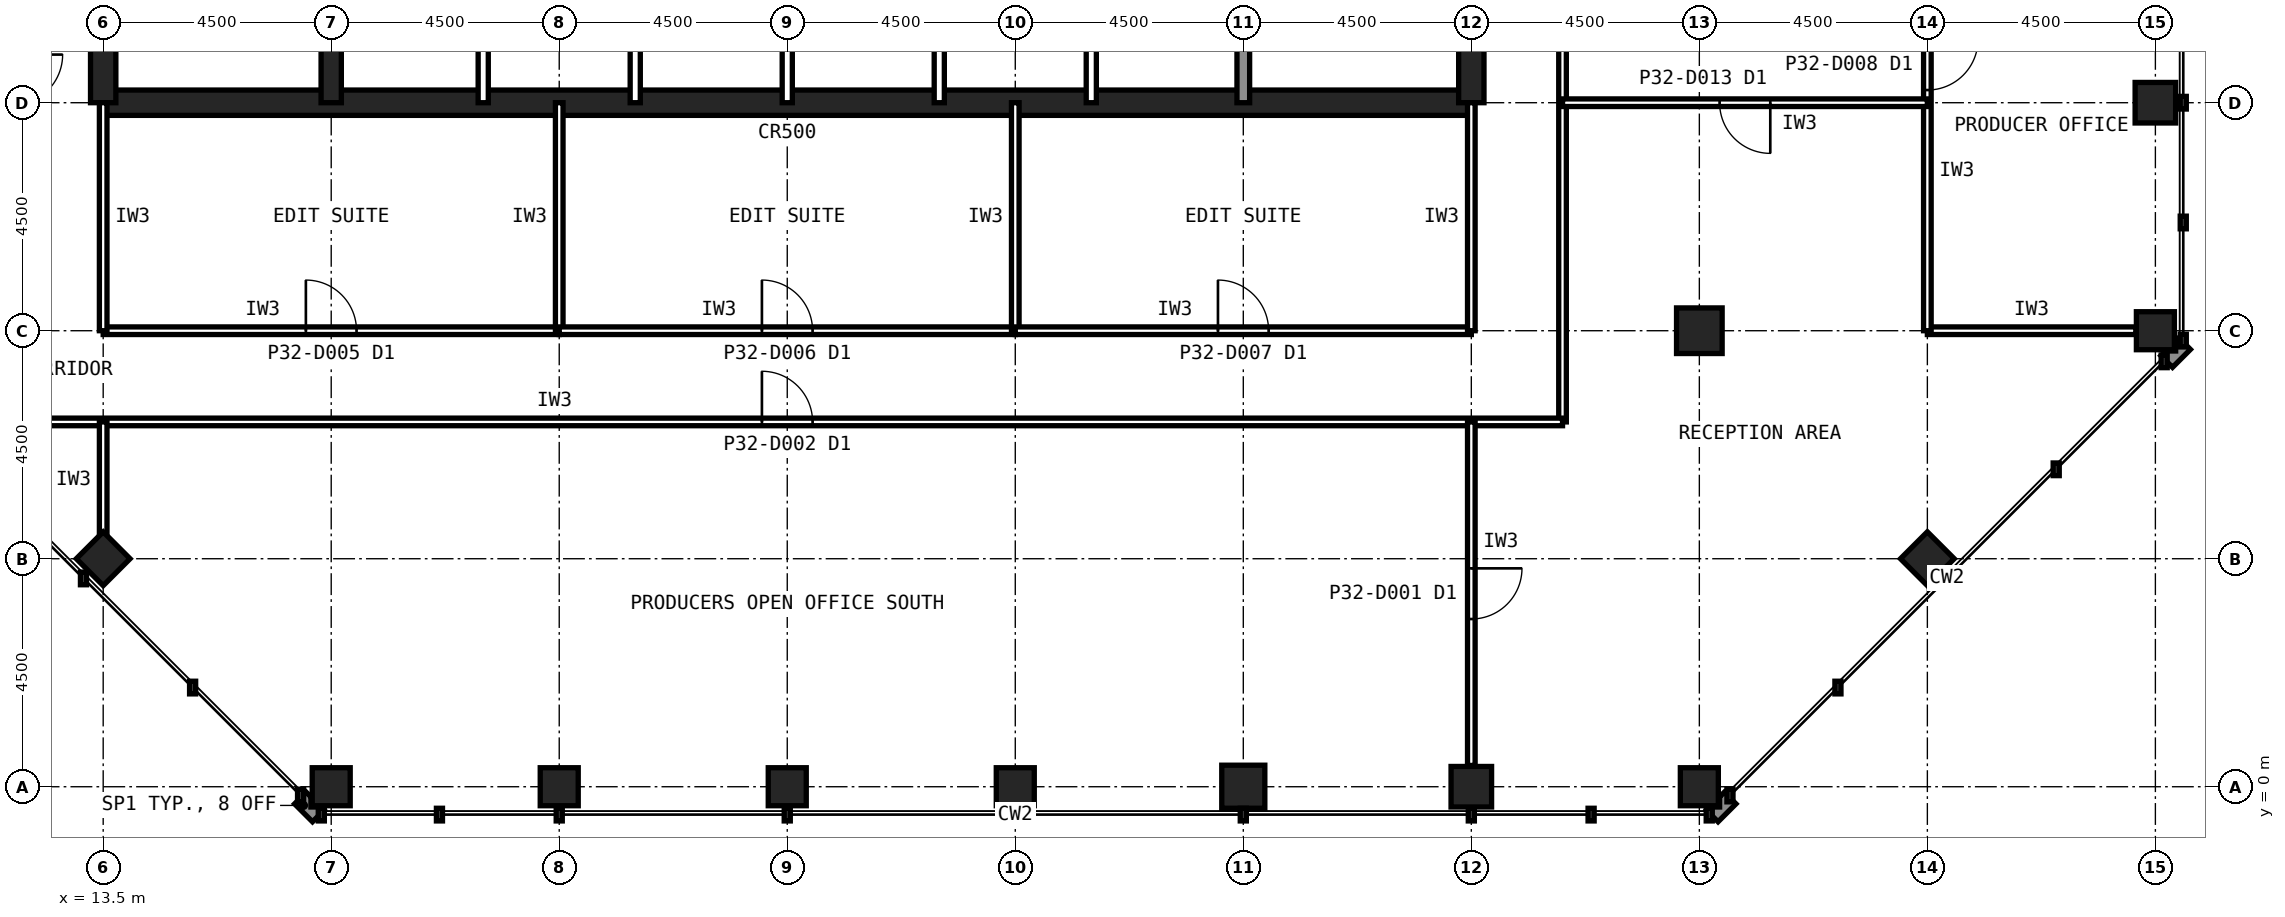
"""IFC4 building model, lengths in metres.
Left out: names, types, materials, properties, quantities, classifications, styles, units other than length and angle.
Written with IfcOpenShell. Run it as: python <this file> out.ifc"""

import sys

from ifc_helpers import new_model, si_unit, direction, frame, frame_2d, origin, origin_2d, place, context, subcontext, project, spatial, rectangle, hollow_rectangle, extrude, element, fill, save


model = new_model("IFC4")
c1 = context("Model", 3, precision=1e-05, world=origin(), true_north=direction((0.0, 1.0)))
c2 = subcontext(c1, "Body", "Model", "MODEL_VIEW")
j1 = project(units=[si_unit("LENGTHUNIT", "METRE"), si_unit("PLANEANGLEUNIT", "RADIAN")], contexts=[c1])
p1 = place(None, origin())
s1 = spatial("IfcSite", under=j1, at=p1, CompositionType="ELEMENT")
p2 = place(p1, origin())
s2 = spatial("IfcBuilding", under=s1, at=p2, CompositionType="ELEMENT")
p3 = place(p2, frame((0.0, 0.0, 135.6)))
s3 = spatial("IfcBuildingStorey", under=s2, at=p3, CompositionType="ELEMENT", Elevation=135.6)
for number, where, z_axis, x_axis in (
    (1, (18.0, 0.0, 0.0), (0.0, 0.0, 1.0), (1.0, 0.0, 0.0)),
    (2, (22.5, 0.0, 0.0), (0.0, 0.0, 1.0), (1.0, 0.0, 0.0)),
    (3, (27.0, 0.0, 0.0), (0.0, 0.0, 1.0), (1.0, 0.0, 0.0)),
    (4, (31.5, 0.0, 0.0), (0.0, 0.0, 1.0), (1.0, 0.0, 0.0)),
):
    element("IfcColumn", number, at=place(p3, frame(where, z_axis=z_axis, x_axis=x_axis)), inside=s3, PredefinedType="COLUMN", context=c2, shape_type="SweptSolid", body=[
        extrude(hollow_rectangle(XDim=0.75, YDim=0.75, WallThickness=0.04, at=origin_2d()), origin(), (0.0, 0.0, 1.0), 4.0),
    ])
p4 = place(p3, frame((36.0, 0.0, 0.0), z_axis=(0.0, 0.0, 1.0), x_axis=(1.0, 0.0, 0.0)))
e5 = element("IfcColumn", 5, at=p4, inside=s3, PredefinedType="COLUMN", context=c2, shape_type="SweptSolid", body=[
    extrude(hollow_rectangle(XDim=0.85, YDim=0.85, WallThickness=0.05, at=origin_2d()), origin(), (0.0, 0.0, 1.0), 4.0),
])
p5 = place(p3, frame((40.5, 0.0, 0.0), z_axis=(0.0, 0.0, 1.0), x_axis=(1.0, 0.0, 0.0)))
e6 = element("IfcColumn", 6, at=p5, inside=s3, PredefinedType="COLUMN", context=c2, shape_type="SweptSolid", body=[
    extrude(hollow_rectangle(XDim=0.8, YDim=0.8, WallThickness=0.045, at=origin_2d()), origin(), (0.0, 0.0, 1.0), 4.0),
])
for number, where, z_axis, x_axis in (
    (7, (45.0, 0.0, 0.0), (0.0, 0.0, 1.0), (1.0, 0.0, 0.0)),
    (8, (54.0, 9.0, 0.0), (0.0, 0.0, 1.0), (1.0, 0.0, 0.0)),
):
    element("IfcColumn", number, at=place(p3, frame(where, z_axis=z_axis, x_axis=x_axis)), inside=s3, PredefinedType="COLUMN", context=c2, shape_type="SweptSolid", body=[
        extrude(hollow_rectangle(XDim=0.75, YDim=0.75, WallThickness=0.04, at=origin_2d()), origin(), (0.0, 0.0, 1.0), 4.0),
    ])
p6 = place(p3, frame((54.0, 13.5, 0.0), z_axis=(0.0, 0.0, 1.0), x_axis=(1.0, 0.0, 0.0)))
e9 = element("IfcColumn", 9, at=p6, inside=s3, PredefinedType="COLUMN", context=c2, shape_type="SweptSolid", body=[
    extrude(hollow_rectangle(XDim=0.8, YDim=0.8, WallThickness=0.045, at=origin_2d()), origin(), (0.0, 0.0, 1.0), 4.0),
])
for number, where, z_axis, x_axis in (
    (10, (13.5, 4.5, 0.0), (0.0, 0.0, 1.0), (0.707, 0.707, 0.0)),
    (11, (49.5, 4.5, 0.0), (0.0, 0.0, 1.0), (0.707, 0.707, 0.0)),
):
    element("IfcColumn", number, at=place(p3, frame(where, z_axis=z_axis, x_axis=x_axis)), inside=s3, PredefinedType="COLUMN", context=c2, shape_type="SweptSolid", body=[
        extrude(hollow_rectangle(XDim=0.75, YDim=0.75, WallThickness=0.04, at=origin_2d()), origin(), (0.0, 0.0, 1.0), 4.0),
    ])
p7 = place(p3, frame((45.0, 9.0, 0.0), z_axis=(0.0, 0.0, 1.0), x_axis=(1.0, 0.0, 0.0)))
e12 = element("IfcColumn", 12, at=p7, inside=s3, PredefinedType="COLUMN", context=c2, shape_type="SweptSolid", body=[
    extrude(hollow_rectangle(XDim=0.9, YDim=0.9, WallThickness=0.063, at=origin_2d()), origin(), (0.0, 0.0, 1.0), 4.0),
])
p8 = place(p3, frame((13.5, 13.5, 0.0), z_axis=(0.0, 0.0, 1.0), x_axis=(1.0, 0.0, 0.0)))
e13 = element("IfcWall", 13, at=p8, inside=s3, PredefinedType="SHEAR", context=c2, shape_type="SweptSolid", body=[
    extrude(rectangle(XDim=27.0, YDim=0.5, at=frame_2d((13.5, 0.0))), origin(), (0.0, 0.0, 1.0), 4.0),
])
p9 = place(p3, frame((40.5, 13.5, 0.0), z_axis=(0.0, 0.0, 1.0), x_axis=(0.0, 1.0, 0.0)))
e14 = element("IfcWall", 14, at=p9, inside=s3, PredefinedType="SHEAR", context=c2, shape_type="SweptSolid", body=[
    extrude(rectangle(XDim=27.0, YDim=0.5, at=frame_2d((13.5, 0.0))), origin(), (0.0, 0.0, 1.0), 4.0),
])
p10 = place(p9, frame((5.85, 0.0, 0.0)))
e15 = element("IfcOpeningElement", 15, at=p10, cuts=e14, PredefinedType="OPENING", context=c2, shape_type="SweptSolid", body=[
    extrude(rectangle(XDim=1.8, YDim=2.1, at=frame_2d((0.9, 1.05))), frame((0.0, 0.26, 0.0), z_axis=(0.0, -1.0, 0.0), x_axis=(1.0, 0.0, 0.0)), (0.0, 0.0, 1.0), 0.52),
])
p11 = place(p9, frame((19.65, 0.0, 0.0)))
e16 = element("IfcOpeningElement", 16, at=p11, cuts=e14, PredefinedType="OPENING", context=c2, shape_type="SweptSolid", body=[
    extrude(rectangle(XDim=1.2, YDim=2.1, at=frame_2d((0.6, 1.05))), frame((0.0, 0.26, 0.0), z_axis=(0.0, -1.0, 0.0), x_axis=(1.0, 0.0, 0.0)), (0.0, 0.0, 1.0), 0.52),
])
p12 = place(p3, frame((13.5, 40.5, 0.0), z_axis=(0.0, 0.0, 1.0), x_axis=(0.0, -1.0, 0.0)))
e17 = element("IfcWall", 17, at=p12, inside=s3, PredefinedType="SHEAR", context=c2, shape_type="SweptSolid", body=[
    extrude(rectangle(XDim=27.0, YDim=0.5, at=frame_2d((13.5, 0.0))), origin(), (0.0, 0.0, 1.0), 4.0),
])
p13 = place(p12, frame((19.65, 0.0, 0.0)))
e18 = element("IfcOpeningElement", 18, at=p13, cuts=e17, PredefinedType="OPENING", context=c2, shape_type="SweptSolid", body=[
    extrude(rectangle(XDim=1.2, YDim=2.1, at=frame_2d((0.6, 1.05))), frame((0.0, 0.26, 0.0), z_axis=(0.0, -1.0, 0.0), x_axis=(1.0, 0.0, 0.0)), (0.0, 0.0, 1.0), 0.52),
])
p14 = place(p12, frame((5.85, 0.0, 0.0)))
e19 = element("IfcOpeningElement", 19, at=p14, cuts=e17, PredefinedType="OPENING", context=c2, shape_type="SweptSolid", body=[
    extrude(rectangle(XDim=1.8, YDim=2.1, at=frame_2d((0.9, 1.05))), frame((0.0, 0.26, 0.0), z_axis=(0.0, -1.0, 0.0), x_axis=(1.0, 0.0, 0.0)), (0.0, 0.0, 1.0), 0.52),
])
p15 = place(p3, frame((18.0, 13.5, 0.0), z_axis=(0.0, 0.0, 1.0), x_axis=(0.0, 1.0, 0.0)))
e20 = element("IfcWall", 20, at=p15, inside=s3, PredefinedType="SHEAR", context=c2, shape_type="SweptSolid", body=[
    extrude(rectangle(XDim=18.0, YDim=0.4, at=frame_2d((9.0, 0.0))), origin(), (0.0, 0.0, 1.0), 4.0),
])
p16 = place(p3, frame((36.0, 13.5, 0.0), z_axis=(0.0, 0.0, 1.0), x_axis=(0.0, 1.0, 0.0)))
e21 = element("IfcWall", 21, at=p16, inside=s3, PredefinedType="SOLIDWALL", context=c2, shape_type="SweptSolid", body=[
    extrude(rectangle(XDim=4.5, YDim=0.25, at=frame_2d((2.25, 0.0))), origin(), (0.0, 0.0, 1.0), 3.84),
])
for number, where, z_axis, x_axis in (
    (22, (21.0, 13.5, 0.0), (0.0, 0.0, 1.0), (0.0, 1.0, 0.0)),
    (23, (24.0, 13.5, 0.0), (0.0, 0.0, 1.0), (0.0, 1.0, 0.0)),
    (24, (27.0, 13.5, 0.0), (0.0, 0.0, 1.0), (0.0, 1.0, 0.0)),
    (25, (30.0, 13.5, 0.0), (0.0, 0.0, 1.0), (0.0, 1.0, 0.0)),
    (26, (33.0, 13.5, 0.0), (0.0, 0.0, 1.0), (0.0, 1.0, 0.0)),
):
    element("IfcWall", number, at=place(p3, frame(where, z_axis=z_axis, x_axis=x_axis)), inside=s3, PredefinedType="PARTITIONING", context=c2, shape_type="SweptSolid", body=[
        extrude(rectangle(XDim=4.5, YDim=0.2, at=frame_2d((2.25, 0.0))), origin(), (0.0, 0.0, 1.0), 3.84),
    ])
p17 = place(p3, frame((42.3, 7.2, 0.0), z_axis=(0.0, 0.0, 1.0), x_axis=(0.0, 1.0, 0.0)))
e27 = element("IfcWall", 27, at=p17, inside=s3, PredefinedType="PARTITIONING", context=c2, shape_type="SweptSolid", body=[
    extrude(rectangle(XDim=33.3, YDim=0.15, at=frame_2d((16.65, 0.0))), origin(), (0.0, 0.0, 1.0), 3.84),
])
p18 = place(p17, frame((16.15, 0.0, 0.0)))
e28 = element("IfcOpeningElement", 28, at=p18, cuts=e27, PredefinedType="OPENING", context=c2, shape_type="SweptSolid", body=[
    extrude(rectangle(XDim=1.0, YDim=2.1, at=frame_2d((0.5, 1.05))), frame((0.0, 0.085, 0.0), z_axis=(0.0, -1.0, 0.0), x_axis=(1.0, 0.0, 0.0)), (0.0, 0.0, 1.0), 0.17),
])
p19 = place(p3, frame((11.7, 7.2, 0.0), z_axis=(0.0, 0.0, 1.0), x_axis=(1.0, 0.0, 0.0)))
e29 = element("IfcWall", 29, at=p19, inside=s3, PredefinedType="PARTITIONING", context=c2, shape_type="SweptSolid", body=[
    extrude(rectangle(XDim=30.6, YDim=0.15, at=frame_2d((15.3, 0.0))), origin(), (0.0, 0.0, 1.0), 3.84),
])
p20 = place(p19, frame((14.8, 0.0, 0.0)))
e30 = element("IfcOpeningElement", 30, at=p20, cuts=e29, PredefinedType="OPENING", context=c2, shape_type="SweptSolid", body=[
    extrude(rectangle(XDim=1.0, YDim=2.1, at=frame_2d((0.5, 1.05))), frame((0.0, 0.085, 0.0), z_axis=(0.0, -1.0, 0.0), x_axis=(1.0, 0.0, 0.0)), (0.0, 0.0, 1.0), 0.17),
])
p21 = place(p3, frame((13.5, 9.0, 0.0), z_axis=(0.0, 0.0, 1.0), x_axis=(1.0, 0.0, 0.0)))
e31 = element("IfcWall", 31, at=p21, inside=s3, PredefinedType="PARTITIONING", context=c2, shape_type="SweptSolid", body=[
    extrude(rectangle(XDim=9.0, YDim=0.15, at=frame_2d((4.5, 0.0))), origin(), (0.0, 0.0, 1.0), 3.84),
])
p22 = place(p21, frame((4.0, 0.0, 0.0)))
e32 = element("IfcOpeningElement", 32, at=p22, cuts=e31, PredefinedType="OPENING", context=c2, shape_type="SweptSolid", body=[
    extrude(rectangle(XDim=1.0, YDim=2.1, at=frame_2d((0.5, 1.05))), frame((0.0, 0.085, 0.0), z_axis=(0.0, -1.0, 0.0), x_axis=(1.0, 0.0, 0.0)), (0.0, 0.0, 1.0), 0.17),
])
for number, where, z_axis, x_axis in (
    (33, (22.5, 9.0, 0.0), (0.0, 0.0, 1.0), (0.0, 1.0, 0.0)),
    (34, (13.5, 13.5, 0.0), (0.0, 0.0, 1.0), (0.0, -1.0, 0.0)),
):
    element("IfcWall", number, at=place(p3, frame(where, z_axis=z_axis, x_axis=x_axis)), inside=s3, PredefinedType="PARTITIONING", context=c2, shape_type="SweptSolid", body=[
        extrude(rectangle(XDim=4.5, YDim=0.15, at=frame_2d((2.25, 0.0))), origin(), (0.0, 0.0, 1.0), 2.989),
    ])
p23 = place(p3, frame((22.5, 9.0, 0.0), z_axis=(0.0, 0.0, 1.0), x_axis=(1.0, 0.0, 0.0)))
e35 = element("IfcWall", 35, at=p23, inside=s3, PredefinedType="PARTITIONING", context=c2, shape_type="SweptSolid", body=[
    extrude(rectangle(XDim=9.0, YDim=0.15, at=frame_2d((4.5, 0.0))), origin(), (0.0, 0.0, 1.0), 3.84),
])
p24 = place(p23, frame((4.0, 0.0, 0.0)))
e36 = element("IfcOpeningElement", 36, at=p24, cuts=e35, PredefinedType="OPENING", context=c2, shape_type="SweptSolid", body=[
    extrude(rectangle(XDim=1.0, YDim=2.1, at=frame_2d((0.5, 1.05))), frame((0.0, 0.085, 0.0), z_axis=(0.0, -1.0, 0.0), x_axis=(1.0, 0.0, 0.0)), (0.0, 0.0, 1.0), 0.17),
])
p25 = place(p3, frame((31.5, 9.0, 0.0), z_axis=(0.0, 0.0, 1.0), x_axis=(0.0, 1.0, 0.0)))
e37 = element("IfcWall", 37, at=p25, inside=s3, PredefinedType="PARTITIONING", context=c2, shape_type="SweptSolid", body=[
    extrude(rectangle(XDim=4.5, YDim=0.15, at=frame_2d((2.25, 0.0))), origin(), (0.0, 0.0, 1.0), 2.989),
])
p26 = place(p3, frame((31.5, 9.0, 0.0), z_axis=(0.0, 0.0, 1.0), x_axis=(1.0, 0.0, 0.0)))
e38 = element("IfcWall", 38, at=p26, inside=s3, PredefinedType="PARTITIONING", context=c2, shape_type="SweptSolid", body=[
    extrude(rectangle(XDim=9.0, YDim=0.15, at=frame_2d((4.5, 0.0))), origin(), (0.0, 0.0, 1.0), 3.84),
])
p27 = place(p26, frame((4.0, 0.0, 0.0)))
e39 = element("IfcOpeningElement", 39, at=p27, cuts=e38, PredefinedType="OPENING", context=c2, shape_type="SweptSolid", body=[
    extrude(rectangle(XDim=1.0, YDim=2.1, at=frame_2d((0.5, 1.05))), frame((0.0, 0.085, 0.0), z_axis=(0.0, -1.0, 0.0), x_axis=(1.0, 0.0, 0.0)), (0.0, 0.0, 1.0), 0.17),
])
p28 = place(p3, frame((40.5, 9.0, 0.0), z_axis=(0.0, 0.0, 1.0), x_axis=(0.0, 1.0, 0.0)))
e40 = element("IfcWall", 40, at=p28, inside=s3, PredefinedType="PARTITIONING", context=c2, shape_type="SweptSolid", body=[
    extrude(rectangle(XDim=4.5, YDim=0.15, at=frame_2d((2.25, 0.0))), origin(), (0.0, 0.0, 1.0), 2.989),
])
p29 = place(p3, frame((49.5, 9.0, 0.0), z_axis=(0.0, 0.0, 1.0), x_axis=(1.0, 0.0, 0.0)))
e41 = element("IfcWall", 41, at=p29, inside=s3, PredefinedType="PARTITIONING", context=c2, shape_type="SweptSolid", body=[
    extrude(rectangle(XDim=4.115, YDim=0.15, at=frame_2d((2.058, 0.0))), origin(), (0.0, 0.0, 1.0), 3.229),
])
p30 = place(p3, frame((49.5, 18.0, 0.0), z_axis=(0.0, 0.0, 1.0), x_axis=(0.0, -1.0, 0.0)))
e42 = element("IfcWall", 42, at=p30, inside=s3, PredefinedType="PARTITIONING", context=c2, shape_type="SweptSolid", body=[
    extrude(rectangle(XDim=9.0, YDim=0.15, at=frame_2d((4.5, 0.0))), origin(), (0.0, 0.0, 1.0), 3.84),
])
p31 = place(p30, frame((3.25, 0.0, 0.0)))
e43 = element("IfcOpeningElement", 43, at=p31, cuts=e42, PredefinedType="OPENING", context=c2, shape_type="SweptSolid", body=[
    extrude(rectangle(XDim=1.0, YDim=2.1, at=frame_2d((0.5, 1.05))), frame((0.0, 0.085, 0.0), z_axis=(0.0, -1.0, 0.0), x_axis=(1.0, 0.0, 0.0)), (0.0, 0.0, 1.0), 0.17),
])
p32 = place(p3, frame((49.5, 13.5, 0.0), z_axis=(0.0, 0.0, 1.0), x_axis=(-1.0, 0.0, 0.0)))
e44 = element("IfcWall", 44, at=p32, inside=s3, PredefinedType="PARTITIONING", context=c2, shape_type="SweptSolid", body=[
    extrude(rectangle(XDim=7.2, YDim=0.15, at=frame_2d((3.6, 0.0))), origin(), (0.0, 0.0, 1.0), 2.989),
])
p33 = place(p32, frame((3.1, 0.0, 0.0)))
e45 = element("IfcOpeningElement", 45, at=p33, cuts=e44, PredefinedType="OPENING", context=c2, shape_type="SweptSolid", body=[
    extrude(rectangle(XDim=1.0, YDim=2.1, at=frame_2d((0.5, 1.05))), frame((0.0, 0.085, 0.0), z_axis=(0.0, -1.0, 0.0), x_axis=(1.0, 0.0, 0.0)), (0.0, 0.0, 1.0), 0.17),
])
p34 = place(p3, frame((13.5, 4.895, 0.0), z_axis=(0.0, 0.0, 1.0), x_axis=(0.0, 1.0, 0.0)))
e46 = element("IfcWall", 46, at=p34, inside=s3, PredefinedType="PARTITIONING", context=c2, shape_type="SweptSolid", body=[
    extrude(rectangle(XDim=2.305, YDim=0.15, at=frame_2d((1.152, 0.0))), origin(), (0.0, 0.0, 1.0), 2.989),
])
p35 = place(p3, frame((40.5, 7.2, 0.0), z_axis=(0.0, 0.0, 1.0), x_axis=(0.0, -1.0, 0.0)))
e47 = element("IfcWall", 47, at=p35, inside=s3, PredefinedType="PARTITIONING", context=c2, shape_type="SweptSolid", body=[
    extrude(rectangle(XDim=6.78, YDim=0.15, at=frame_2d((3.39, 0.0))), origin(), (0.0, 0.0, 1.0), 2.989),
])
p36 = place(p35, frame((2.89, 0.0, 0.0)))
e48 = element("IfcOpeningElement", 48, at=p36, cuts=e47, PredefinedType="OPENING", context=c2, shape_type="SweptSolid", body=[
    extrude(rectangle(XDim=1.0, YDim=2.1, at=frame_2d((0.5, 1.05))), frame((0.0, 0.085, 0.0), z_axis=(0.0, -1.0, 0.0), x_axis=(1.0, 0.0, 0.0)), (0.0, 0.0, 1.0), 0.17),
])
p37 = place(p20, origin())
e49 = element("IfcDoor", 49, at=p37, inside=s3, OperationType="SINGLE_SWING_LEFT", PredefinedType="DOOR", context=c2, shape_type="SweptSolid", body=[
    extrude(rectangle(XDim=1.0, YDim=2.1, at=frame_2d((0.5, 1.05))), frame((0.0, 0.025, 0.0), z_axis=(0.0, -1.0, 0.0), x_axis=(1.0, 0.0, 0.0)), (0.0, 0.0, 1.0), 0.05),
])
fill(e30, e49)
p38 = place(p22, origin())
e50 = element("IfcDoor", 50, at=p38, inside=s3, OperationType="SINGLE_SWING_LEFT", PredefinedType="DOOR", context=c2, shape_type="SweptSolid", body=[
    extrude(rectangle(XDim=1.0, YDim=2.1, at=frame_2d((0.5, 1.05))), frame((0.0, 0.025, 0.0), z_axis=(0.0, -1.0, 0.0), x_axis=(1.0, 0.0, 0.0)), (0.0, 0.0, 1.0), 0.05),
])
fill(e32, e50)
p39 = place(p24, origin())
e51 = element("IfcDoor", 51, at=p39, inside=s3, OperationType="SINGLE_SWING_LEFT", PredefinedType="DOOR", context=c2, shape_type="SweptSolid", body=[
    extrude(rectangle(XDim=1.0, YDim=2.1, at=frame_2d((0.5, 1.05))), frame((0.0, 0.025, 0.0), z_axis=(0.0, -1.0, 0.0), x_axis=(1.0, 0.0, 0.0)), (0.0, 0.0, 1.0), 0.05),
])
fill(e36, e51)
p40 = place(p27, origin())
e52 = element("IfcDoor", 52, at=p40, inside=s3, OperationType="SINGLE_SWING_LEFT", PredefinedType="DOOR", context=c2, shape_type="SweptSolid", body=[
    extrude(rectangle(XDim=1.0, YDim=2.1, at=frame_2d((0.5, 1.05))), frame((0.0, 0.025, 0.0), z_axis=(0.0, -1.0, 0.0), x_axis=(1.0, 0.0, 0.0)), (0.0, 0.0, 1.0), 0.05),
])
fill(e39, e52)
p41 = place(p31, origin())
e53 = element("IfcDoor", 53, at=p41, inside=s3, OperationType="SINGLE_SWING_LEFT", PredefinedType="DOOR", context=c2, shape_type="SweptSolid", body=[
    extrude(rectangle(XDim=1.0, YDim=2.1, at=frame_2d((0.5, 1.05))), frame((0.0, 0.025, 0.0), z_axis=(0.0, -1.0, 0.0), x_axis=(1.0, 0.0, 0.0)), (0.0, 0.0, 1.0), 0.05),
])
fill(e43, e53)
p42 = place(p33, origin())
e54 = element("IfcDoor", 54, at=p42, inside=s3, OperationType="SINGLE_SWING_LEFT", PredefinedType="DOOR", context=c2, shape_type="SweptSolid", body=[
    extrude(rectangle(XDim=1.0, YDim=2.1, at=frame_2d((0.5, 1.05))), frame((0.0, 0.025, 0.0), z_axis=(0.0, -1.0, 0.0), x_axis=(1.0, 0.0, 0.0)), (0.0, 0.0, 1.0), 0.05),
])
fill(e45, e54)
p43 = place(p36, origin())
e55 = element("IfcDoor", 55, at=p43, inside=s3, OperationType="SINGLE_SWING_LEFT", PredefinedType="DOOR", context=c2, shape_type="SweptSolid", body=[
    extrude(rectangle(XDim=1.0, YDim=2.1, at=frame_2d((0.5, 1.05))), frame((0.0, 0.025, 0.0), z_axis=(0.0, -1.0, 0.0), x_axis=(1.0, 0.0, 0.0)), (0.0, 0.0, 1.0), 0.05),
])
fill(e48, e55)
save(model, sys.argv[1])
